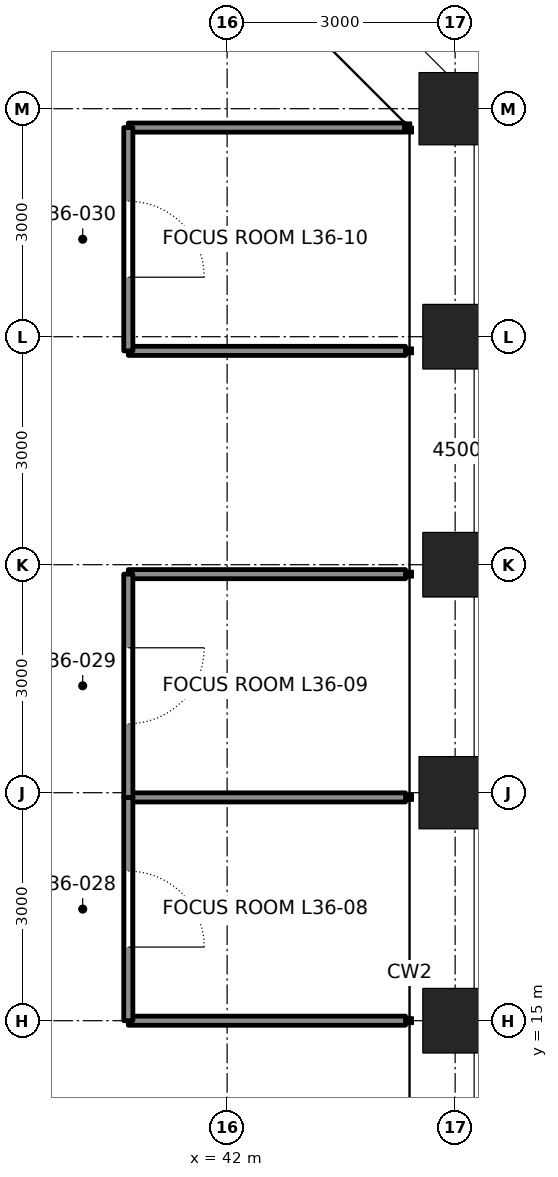
"""IFC4 building model, lengths in metres.
Left out: names, types, materials, properties, quantities, classifications, styles, units other than length and angle.
Written with IfcOpenShell. Run it as: python <this file> out.ifc"""

import sys

from ifc_helpers import new_model, si_unit, direction, frame, frame_2d, origin, origin_2d, place, context, subcontext, project, spatial, rectangle, hollow_rectangle, extrude, element, fill, save


model = new_model("IFC4")
c1 = context("Model", 3, precision=1e-05, world=origin(), true_north=direction((0.0, 1.0)))
c2 = subcontext(c1, "Body", "Model", "MODEL_VIEW")
j1 = project(units=[si_unit("LENGTHUNIT", "METRE"), si_unit("PLANEANGLEUNIT", "RADIAN")], contexts=[c1])
p1 = place(None, origin())
s1 = spatial("IfcSite", under=j1, at=p1, CompositionType="ELEMENT")
p2 = place(p1, origin())
s2 = spatial("IfcBuilding", under=s1, at=p2, CompositionType="ELEMENT")
p3 = place(p2, frame((0.0, 0.0, 165.6)))
s3 = spatial("IfcBuildingStorey", under=s2, at=p3, CompositionType="ELEMENT", Elevation=165.6)
p4 = place(p3, frame((45.0, 15.0, 0.0), z_axis=(0.0, 0.0, 1.0), x_axis=(1.0, 0.0, 0.0)))
e1 = element("IfcColumn", 1, at=p4, inside=s3, PredefinedType="COLUMN", context=c2, shape_type="SweptSolid", body=[
    extrude(hollow_rectangle(XDim=0.85, YDim=0.85, WallThickness=0.085, at=origin_2d()), origin(), (0.0, 0.0, 1.0), 4.2),
])
p5 = place(p3, frame((45.0, 18.0, 0.0), z_axis=(0.0, 0.0, 1.0), x_axis=(1.0, 0.0, 0.0)))
e2 = element("IfcColumn", 2, at=p5, inside=s3, PredefinedType="COLUMN", context=c2, shape_type="SweptSolid", body=[
    extrude(hollow_rectangle(XDim=0.95, YDim=0.95, WallThickness=0.11, at=origin_2d()), origin(), (0.0, 0.0, 1.0), 4.2),
])
for number, where, z_axis, x_axis in (
    (3, (45.0, 21.0, 0.0), (0.0, 0.0, 1.0), (1.0, 0.0, 0.0)),
    (4, (45.0, 24.0, 0.0), (0.0, 0.0, 1.0), (1.0, 0.0, 0.0)),
):
    element("IfcColumn", number, at=place(p3, frame(where, z_axis=z_axis, x_axis=x_axis)), inside=s3, PredefinedType="COLUMN", context=c2, shape_type="SweptSolid", body=[
        extrude(hollow_rectangle(XDim=0.85, YDim=0.85, WallThickness=0.085, at=origin_2d()), origin(), (0.0, 0.0, 1.0), 4.2),
    ])
p6 = place(p3, frame((45.0, 27.0, 0.0), z_axis=(0.0, 0.0, 1.0), x_axis=(1.0, 0.0, 0.0)))
e5 = element("IfcColumn", 5, at=p6, inside=s3, PredefinedType="COLUMN", context=c2, shape_type="SweptSolid", body=[
    extrude(hollow_rectangle(XDim=0.95, YDim=0.95, WallThickness=0.095, at=origin_2d()), origin(), (0.0, 0.0, 1.0), 4.2),
])
for number, where, z_axis, x_axis in (
    (6, (44.347, 15.0, 0.0), (0.0, 0.0, 1.0), (-1.0, 0.0, 0.0)),
    (7, (44.347, 17.938, 0.0), (0.0, 0.0, 1.0), (-1.0, 0.0, 0.0)),
    (8, (44.347, 20.876, 0.0), (0.0, 0.0, 1.0), (-1.0, 0.0, 0.0)),
):
    element("IfcWall", number, at=place(p3, frame(where, z_axis=z_axis, x_axis=x_axis)), inside=s3, PredefinedType="PARTITIONING", context=c2, shape_type="SweptSolid", body=[
        extrude(rectangle(XDim=3.647, YDim=0.12, at=frame_2d((1.824, 0.0))), origin(), (0.0, 0.0, 1.0), 3.357),
    ])
p7 = place(p3, frame((44.347, 23.814, 0.0), z_axis=(0.0, 0.0, 1.0), x_axis=(-1.0, 0.0, 0.0)))
e9 = element("IfcWall", 9, at=p7, inside=s3, PredefinedType="PARTITIONING", context=c2, shape_type="SweptSolid", body=[
    extrude(rectangle(XDim=3.647, YDim=0.12, at=frame_2d((1.824, 0.0))), origin(), (0.0, 0.0, 1.0), 4.04),
])
p8 = place(p3, frame((44.334, 26.751, 0.0), z_axis=(0.0, 0.0, 1.0), x_axis=(-1.0, 0.0, 0.0)))
e10 = element("IfcWall", 10, at=p8, inside=s3, PredefinedType="PARTITIONING", context=c2, shape_type="SweptSolid", body=[
    extrude(rectangle(XDim=3.634, YDim=0.12, at=frame_2d((1.817, 0.0))), origin(), (0.0, 0.0, 1.0), 4.04),
])
p9 = place(p3, frame((40.7, 15.0, 0.0), z_axis=(0.0, 0.0, 1.0), x_axis=(0.0, 1.0, 0.0)))
e11 = element("IfcWall", 11, at=p9, inside=s3, PredefinedType="PARTITIONING", context=c2, shape_type="SweptSolid", body=[
    extrude(rectangle(XDim=2.938, YDim=0.12, at=frame_2d((1.469, 0.0))), origin(), (0.0, 0.0, 1.0), 4.04),
])
p10 = place(p9, frame((0.969, 0.0, 0.0)))
e12 = element("IfcOpeningElement", 12, at=p10, cuts=e11, PredefinedType="OPENING", context=c2, shape_type="SweptSolid", body=[
    extrude(rectangle(XDim=1.0, YDim=2.4, at=frame_2d((0.5, 1.2))), frame((0.0, 0.07, 0.0), z_axis=(0.0, -1.0, 0.0), x_axis=(1.0, 0.0, 0.0)), (0.0, 0.0, 1.0), 0.14),
])
p11 = place(p3, frame((40.7, 17.938, 0.0), z_axis=(0.0, 0.0, 1.0), x_axis=(0.0, 1.0, 0.0)))
e13 = element("IfcWall", 13, at=p11, inside=s3, PredefinedType="PARTITIONING", context=c2, shape_type="SweptSolid", body=[
    extrude(rectangle(XDim=2.938, YDim=0.12, at=frame_2d((1.469, 0.0))), origin(), (0.0, 0.0, 1.0), 4.04),
])
p12 = place(p11, frame((0.969, 0.0, 0.0)))
e14 = element("IfcOpeningElement", 14, at=p12, cuts=e13, PredefinedType="OPENING", context=c2, shape_type="SweptSolid", body=[
    extrude(rectangle(XDim=1.0, YDim=2.4, at=frame_2d((0.5, 1.2))), frame((0.0, 0.07, 0.0), z_axis=(0.0, -1.0, 0.0), x_axis=(1.0, 0.0, 0.0)), (0.0, 0.0, 1.0), 0.14),
])
p13 = place(p3, frame((40.7, 23.814, 0.0), z_axis=(0.0, 0.0, 1.0), x_axis=(0.0, 1.0, 0.0)))
e15 = element("IfcWall", 15, at=p13, inside=s3, PredefinedType="PARTITIONING", context=c2, shape_type="SweptSolid", body=[
    extrude(rectangle(XDim=2.938, YDim=0.12, at=frame_2d((1.469, 0.0))), origin(), (0.0, 0.0, 1.0), 4.04),
])
p14 = place(p13, frame((0.969, 0.0, 0.0)))
e16 = element("IfcOpeningElement", 16, at=p14, cuts=e15, PredefinedType="OPENING", context=c2, shape_type="SweptSolid", body=[
    extrude(rectangle(XDim=1.0, YDim=2.4, at=frame_2d((0.5, 1.2))), frame((0.0, 0.07, 0.0), z_axis=(0.0, -1.0, 0.0), x_axis=(1.0, 0.0, 0.0)), (0.0, 0.0, 1.0), 0.14),
])
p15 = place(p10, frame((1.0, 0.0, 0.0), z_axis=(0.0, 0.0, 1.0), x_axis=(-1.0, 0.0, 0.0)))
e17 = element("IfcDoor", 17, at=p15, inside=s3, OperationType="SINGLE_SWING_RIGHT", PredefinedType="DOOR", context=c2, shape_type="SweptSolid", body=[
    extrude(rectangle(XDim=1.0, YDim=2.4, at=frame_2d((0.5, 1.2))), frame((0.0, 0.025, 0.0), z_axis=(0.0, -1.0, 0.0), x_axis=(1.0, 0.0, 0.0)), (0.0, 0.0, 1.0), 0.05),
])
fill(e12, e17)
p16 = place(p12, frame((1.0, 0.0, 0.0), z_axis=(0.0, 0.0, 1.0), x_axis=(-1.0, 0.0, 0.0)))
e18 = element("IfcDoor", 18, at=p16, inside=s3, OperationType="SINGLE_SWING_LEFT", PredefinedType="DOOR", context=c2, shape_type="SweptSolid", body=[
    extrude(rectangle(XDim=1.0, YDim=2.4, at=frame_2d((0.5, 1.2))), frame((0.0, 0.025, 0.0), z_axis=(0.0, -1.0, 0.0), x_axis=(1.0, 0.0, 0.0)), (0.0, 0.0, 1.0), 0.05),
])
fill(e14, e18)
p17 = place(p14, frame((1.0, 0.0, 0.0), z_axis=(0.0, 0.0, 1.0), x_axis=(-1.0, 0.0, 0.0)))
e19 = element("IfcDoor", 19, at=p17, inside=s3, OperationType="SINGLE_SWING_RIGHT", PredefinedType="DOOR", context=c2, shape_type="SweptSolid", body=[
    extrude(rectangle(XDim=1.0, YDim=2.4, at=frame_2d((0.5, 1.2))), frame((0.0, 0.025, 0.0), z_axis=(0.0, -1.0, 0.0), x_axis=(1.0, 0.0, 0.0)), (0.0, 0.0, 1.0), 0.05),
])
fill(e16, e19)
save(model, sys.argv[1])
